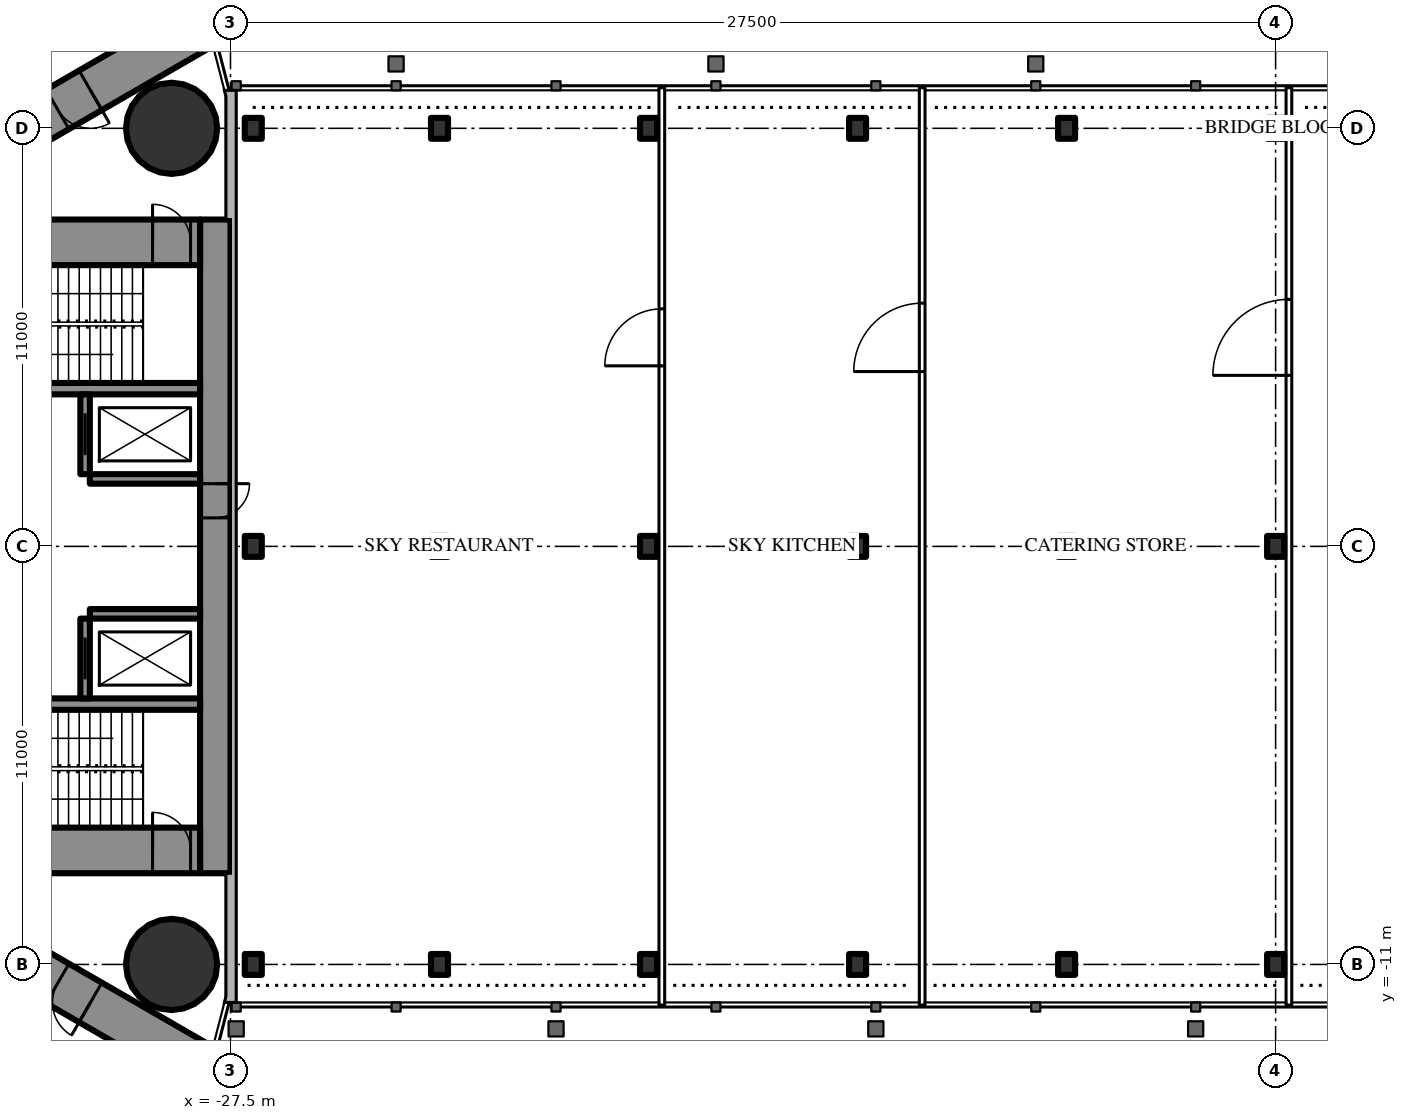
"""IFC4 building model, lengths in metres.
Left out: names, types, materials, properties, quantities, classifications, styles, units other than length and angle.
Written with IfcOpenShell. Run it as: python <this file> out.ifc"""

import sys

from ifc_helpers import new_model, si_unit, direction, frame, frame_2d, origin, origin_2d, place, context, subcontext, project, spatial, rectangle, circle, i_section, extrude, element, fill, save


model = new_model("IFC4")
c1 = context("Model", 3, precision=1e-05, world=origin(), true_north=direction((0.0, 1.0)))
c2 = subcontext(c1, "Body", "Model", "MODEL_VIEW")
j1 = project(units=[si_unit("LENGTHUNIT", "METRE"), si_unit("PLANEANGLEUNIT", "RADIAN")], contexts=[c1])
p1 = place(None, origin())
s1 = spatial("IfcSite", under=j1, at=p1, CompositionType="ELEMENT")
p2 = place(p1, origin())
s2 = spatial("IfcBuilding", under=s1, at=p2, CompositionType="ELEMENT")
p3 = place(p2, frame((0.0, 0.0, 251.9)))
s3 = spatial("IfcBuildingStorey", under=s2, at=p3, CompositionType="ELEMENT", Elevation=251.9)
for number, where, z_axis, x_axis in (
    (1, (-29.05, -11.0, 0.0), (0.0, 0.0, 1.0), (1.0, 0.0, 0.0)),
    (2, (-29.05, 11.0, 0.0), (0.0, 0.0, 1.0), (1.0, 0.0, 0.0)),
):
    element("IfcColumn", number, at=place(p3, frame(where, z_axis=z_axis, x_axis=x_axis)), inside=s3, PredefinedType="COLUMN", context=c2, shape_type="SweptSolid", body=[
        extrude(circle(Radius=1.2, at=origin_2d()), origin(), (0.0, 0.0, 1.0), 5.4),
    ])
p4 = place(p3, frame((-27.9, 8.6, 0.0), z_axis=(0.0, 0.0, 1.0), x_axis=(0.0, -1.0, 0.0)))
e3 = element("IfcWall", 3, at=p4, inside=s3, PredefinedType="SHEAR", context=c2, shape_type="SweptSolid", body=[
    extrude(rectangle(XDim=17.2, YDim=0.8, at=frame_2d((8.6, 0.0))), origin(), (0.0, 0.0, 1.0), 5.4),
])
p5 = place(p4, frame((6.95, 0.0, 0.0)))
e4 = element("IfcOpeningElement", 4, at=p5, cuts=e3, PredefinedType="OPENING", context=c2, shape_type="SweptSolid", body=[
    extrude(rectangle(XDim=0.9, YDim=2.2, at=frame_2d((0.45, 1.1))), frame((0.0, 0.41, 0.0), z_axis=(0.0, -1.0, 0.0), x_axis=(1.0, 0.0, 0.0)), (0.0, 0.0, 1.0), 0.82),
])
p6 = place(p3, frame((-28.3, 8.0, 0.0), z_axis=(0.0, 0.0, 1.0), x_axis=(-1.0, 0.0, 0.0)))
e5 = element("IfcWall", 5, at=p6, inside=s3, PredefinedType="SHEAR", context=c2, shape_type="SweptSolid", body=[
    extrude(rectangle(XDim=8.4, YDim=1.2, at=frame_2d((4.2, 0.0))), origin(), (0.0, 0.0, 1.0), 5.4),
])
p7 = place(p6, frame((0.25, 0.0, 0.0)))
e6 = element("IfcOpeningElement", 6, at=p7, cuts=e5, PredefinedType="OPENING", context=c2, shape_type="SweptSolid", body=[
    extrude(rectangle(XDim=1.0, YDim=2.2, at=frame_2d((0.5, 1.1))), frame((0.0, 0.61, 0.0), z_axis=(0.0, -1.0, 0.0), x_axis=(1.0, 0.0, 0.0)), (0.0, 0.0, 1.0), 1.22),
])
p8 = place(p3, frame((-28.3, -8.0, 0.0), z_axis=(0.0, 0.0, 1.0), x_axis=(-1.0, 0.0, 0.0)))
e7 = element("IfcWall", 7, at=p8, inside=s3, PredefinedType="SHEAR", context=c2, shape_type="SweptSolid", body=[
    extrude(rectangle(XDim=8.4, YDim=1.2, at=frame_2d((4.2, 0.0))), origin(), (0.0, 0.0, 1.0), 5.4),
])
p9 = place(p8, frame((0.25, 0.0, 0.0)))
e8 = element("IfcOpeningElement", 8, at=p9, cuts=e7, PredefinedType="OPENING", context=c2, shape_type="SweptSolid", body=[
    extrude(rectangle(XDim=1.0, YDim=2.2, at=frame_2d((0.5, 1.1))), frame((0.0, 0.61, 0.0), z_axis=(0.0, -1.0, 0.0), x_axis=(1.0, 0.0, 0.0)), (0.0, 0.0, 1.0), 1.22),
])
for number, where, z_axis, x_axis in (
    (9, (-28.3, 4.15, 0.0), (0.0, 0.0, 1.0), (-1.0, 0.0, 0.0)),
    (10, (-28.3, -4.15, 0.0), (0.0, 0.0, 1.0), (-1.0, 0.0, 0.0)),
):
    element("IfcWall", number, at=place(p3, frame(where, z_axis=z_axis, x_axis=x_axis)), inside=s3, PredefinedType="SHEAR", context=c2, shape_type="SweptSolid", body=[
        extrude(rectangle(XDim=8.4, YDim=0.3, at=frame_2d((4.2, 0.0))), origin(), (0.0, 0.0, 1.0), 5.4),
    ])
p10 = place(p3, frame((-31.325, 4.0, 0.0), z_axis=(0.0, 0.0, 1.0), x_axis=(0.0, -1.0, 0.0)))
e11 = element("IfcWall", 11, at=p10, inside=s3, PredefinedType="SHEAR", context=c2, shape_type="SweptSolid", body=[
    extrude(rectangle(XDim=2.1, YDim=0.25, at=frame_2d((1.05, 0.0))), origin(), (0.0, 0.0, 1.0), 5.4),
])
p11 = place(p10, frame((0.5, 0.0, 0.0)))
e12 = element("IfcOpeningElement", 12, at=p11, cuts=e11, PredefinedType="OPENING", context=c2, shape_type="SweptSolid", body=[
    extrude(rectangle(XDim=1.1, YDim=2.2, at=frame_2d((0.55, 1.1))), frame((0.0, 0.135, 0.0), z_axis=(0.0, -1.0, 0.0), x_axis=(1.0, 0.0, 0.0)), (0.0, 0.0, 1.0), 0.27),
])
p12 = place(p3, frame((-28.3, 1.775, 0.0), z_axis=(0.0, 0.0, 1.0), x_axis=(-1.0, 0.0, 0.0)))
e13 = element("IfcWall", 13, at=p12, inside=s3, PredefinedType="SHEAR", context=c2, shape_type="SweptSolid", body=[
    extrude(rectangle(XDim=2.9, YDim=0.25, at=frame_2d((1.45, 0.0))), origin(), (0.0, 0.0, 1.0), 5.4),
])
p13 = place(p3, frame((-31.325, -1.9, 0.0), z_axis=(0.0, 0.0, 1.0), x_axis=(0.0, -1.0, 0.0)))
e14 = element("IfcWall", 14, at=p13, inside=s3, PredefinedType="SHEAR", context=c2, shape_type="SweptSolid", body=[
    extrude(rectangle(XDim=2.1, YDim=0.25, at=frame_2d((1.05, 0.0))), origin(), (0.0, 0.0, 1.0), 5.4),
])
p14 = place(p13, frame((0.5, 0.0, 0.0)))
e15 = element("IfcOpeningElement", 15, at=p14, cuts=e14, PredefinedType="OPENING", context=c2, shape_type="SweptSolid", body=[
    extrude(rectangle(XDim=1.1, YDim=2.2, at=frame_2d((0.55, 1.1))), frame((0.0, 0.135, 0.0), z_axis=(0.0, -1.0, 0.0), x_axis=(1.0, 0.0, 0.0)), (0.0, 0.0, 1.0), 0.27),
])
p15 = place(p3, frame((-28.3, -1.775, 0.0), z_axis=(0.0, 0.0, 1.0), x_axis=(-1.0, 0.0, 0.0)))
e16 = element("IfcWall", 16, at=p15, inside=s3, PredefinedType="SHEAR", context=c2, shape_type="SweptSolid", body=[
    extrude(rectangle(XDim=2.9, YDim=0.25, at=frame_2d((1.45, 0.0))), origin(), (0.0, 0.0, 1.0), 5.4),
])
p16 = place(p3, frame((-27.2, 14.3, 0.0), z_axis=(0.0, 0.0, 1.0), x_axis=(-0.866026593062, -0.499997940104, 0.0)))
e17 = element("IfcWall", 17, at=p16, inside=s3, PredefinedType="SHEAR", context=c2, shape_type="SweptSolid", body=[
    extrude(rectangle(XDim=28.946, YDim=1.2, at=frame_2d((14.473, 0.0))), origin(), (0.0, 0.0, 1.0), 5.4),
])
p17 = place(p16, frame((4.6, 0.0, 0.0)))
e18 = element("IfcOpeningElement", 18, at=p17, cuts=e17, PredefinedType="OPENING", context=c2, shape_type="SweptSolid", body=[
    extrude(rectangle(XDim=1.0, YDim=2.2, at=frame_2d((0.5, 1.1))), frame((0.0, 0.61, 0.0), z_axis=(0.0, -1.0, 0.0), x_axis=(1.0, 0.0, 0.0)), (0.0, 0.0, 1.0), 1.22),
])
p18 = place(p16, frame((13.395, 0.0, 0.0)))
e19 = element("IfcOpeningElement", 19, at=p18, cuts=e17, PredefinedType="OPENING", context=c2, shape_type="SweptSolid", body=[
    extrude(rectangle(XDim=1.8, YDim=2.2, at=frame_2d((0.9, 1.1))), frame((0.0, 0.61, 0.0), z_axis=(0.0, -1.0, 0.0), x_axis=(1.0, 0.0, 0.0)), (0.0, 0.0, 1.0), 1.22),
])
p19 = place(p3, frame((-27.2, -14.3, 0.0), z_axis=(0.0, 0.0, 1.0), x_axis=(-0.866024021859, 0.500002393557, 0.0)))
e20 = element("IfcWall", 20, at=p19, inside=s3, PredefinedType="SHEAR", context=c2, shape_type="SweptSolid", body=[
    extrude(rectangle(XDim=27.907, YDim=1.2, at=frame_2d((13.954, 0.0))), origin(), (0.0, 0.0, 1.0), 5.4),
])
p20 = place(p19, frame((4.6, 0.0, 0.0)))
e21 = element("IfcOpeningElement", 21, at=p20, cuts=e20, PredefinedType="OPENING", context=c2, shape_type="SweptSolid", body=[
    extrude(rectangle(XDim=1.0, YDim=2.2, at=frame_2d((0.5, 1.1))), frame((0.0, 0.61, 0.0), z_axis=(0.0, -1.0, 0.0), x_axis=(1.0, 0.0, 0.0)), (0.0, 0.0, 1.0), 1.22),
])
p21 = place(p19, frame((13.395, 0.0, 0.0)))
e22 = element("IfcOpeningElement", 22, at=p21, cuts=e20, PredefinedType="OPENING", context=c2, shape_type="SweptSolid", body=[
    extrude(rectangle(XDim=1.8, YDim=2.2, at=frame_2d((0.9, 1.1))), frame((0.0, 0.61, 0.0), z_axis=(0.0, -1.0, 0.0), x_axis=(1.0, 0.0, 0.0)), (0.0, 0.0, 1.0), 1.22),
])
for number, where, z_axis, x_axis in (
    (23, (-26.9, -11.0, 0.0), (0.0, 0.0, 1.0), (1.0, 0.0, 0.0)),
    (24, (-22.0, -11.0, 0.0), (0.0, 0.0, 1.0), (1.0, 0.0, 0.0)),
    (25, (-16.5, -11.0, 0.0), (0.0, 0.0, 1.0), (1.0, 0.0, 0.0)),
    (26, (-11.0, -11.0, 0.0), (0.0, 0.0, 1.0), (1.0, 0.0, 0.0)),
    (27, (-5.5, -11.0, 0.0), (0.0, 0.0, 1.0), (1.0, 0.0, 0.0)),
    (28, (0.0, -11.0, 0.0), (0.0, 0.0, 1.0), (1.0, 0.0, 0.0)),
    (29, (-26.9, 0.0, 0.0), (0.0, 0.0, 1.0), (1.0, 0.0, 0.0)),
    (30, (-22.0, 0.0, 0.0), (0.0, 0.0, 1.0), (1.0, 0.0, 0.0)),
    (31, (-16.5, 0.0, 0.0), (0.0, 0.0, 1.0), (1.0, 0.0, 0.0)),
    (32, (-11.0, 0.0, 0.0), (0.0, 0.0, 1.0), (1.0, 0.0, 0.0)),
    (33, (-5.5, 0.0, 0.0), (0.0, 0.0, 1.0), (1.0, 0.0, 0.0)),
    (34, (0.0, 0.0, 0.0), (0.0, 0.0, 1.0), (1.0, 0.0, 0.0)),
    (35, (-26.9, 11.0, 0.0), (0.0, 0.0, 1.0), (1.0, 0.0, 0.0)),
    (36, (-22.0, 11.0, 0.0), (0.0, 0.0, 1.0), (1.0, 0.0, 0.0)),
    (37, (-16.5, 11.0, 0.0), (0.0, 0.0, 1.0), (1.0, 0.0, 0.0)),
    (38, (-11.0, 11.0, 0.0), (0.0, 0.0, 1.0), (1.0, 0.0, 0.0)),
    (39, (-5.5, 11.0, 0.0), (0.0, 0.0, 1.0), (1.0, 0.0, 0.0)),
    (40, (0.0, 11.0, 0.0), (0.0, 0.0, 1.0), (1.0, 0.0, 0.0)),
):
    element("IfcColumn", number, at=place(p3, frame(where, z_axis=z_axis, x_axis=x_axis)), inside=s3, PredefinedType="COLUMN", context=c2, shape_type="SweptSolid", body=[
        extrude(i_section(OverallWidth=0.448, OverallDepth=0.55, WebThickness=0.072, FlangeThickness=0.115, FilletRadius=0.02, at=origin_2d()), origin(), (0.0, 0.0, 1.0), 5.4),
    ])
p22 = place(p3, frame((-28.681, 16.101, 0.0), z_axis=(0.0, 0.0, 1.0), x_axis=(-0.866024860443, -0.500000941094, 0.0)))
e41 = element("IfcWall", 41, at=p22, inside=s3, PredefinedType="PARTITIONING", context=c2, shape_type="SweptSolid", body=[
    extrude(rectangle(XDim=32.201, YDim=0.2, at=frame_2d((16.101, 0.0))), origin(), (0.0, 0.0, 1.0), 5.15),
])
p23 = place(p22, frame((7.266, 0.0, 0.0)))
e42 = element("IfcOpeningElement", 42, at=p23, cuts=e41, PredefinedType="OPENING", context=c2, shape_type="SweptSolid", body=[
    extrude(rectangle(XDim=1.8, YDim=2.2, at=frame_2d((0.9, 1.1))), frame((0.0, 0.11, 0.0), z_axis=(0.0, -1.0, 0.0), x_axis=(1.0, 0.0, 0.0)), (0.0, 0.0, 1.0), 0.22),
])
p24 = place(p22, frame((17.182, 0.0, 0.0)))
e43 = element("IfcOpeningElement", 43, at=p24, cuts=e41, PredefinedType="OPENING", context=c2, shape_type="SweptSolid", body=[
    extrude(rectangle(XDim=2.0, YDim=2.4, at=frame_2d((1.0, 1.2))), frame((0.0, 0.11, 0.0), z_axis=(0.0, -1.0, 0.0), x_axis=(1.0, 0.0, 0.0)), (0.0, 0.0, 1.0), 0.22),
])
p25 = place(p22, frame((21.43, 0.0, 0.0)))
e44 = element("IfcOpeningElement", 44, at=p25, cuts=e41, PredefinedType="OPENING", context=c2, shape_type="SweptSolid", body=[
    extrude(rectangle(XDim=1.8, YDim=2.2, at=frame_2d((0.9, 1.1))), frame((0.0, 0.11, 0.0), z_axis=(0.0, -1.0, 0.0), x_axis=(1.0, 0.0, 0.0)), (0.0, 0.0, 1.0), 0.22),
])
p26 = place(p22, frame((27.29, 0.0, 0.0)))
e45 = element("IfcOpeningElement", 45, at=p26, cuts=e41, PredefinedType="OPENING", context=c2, shape_type="SweptSolid", body=[
    extrude(rectangle(XDim=1.8, YDim=2.2, at=frame_2d((0.9, 1.1))), frame((0.0, 0.11, 0.0), z_axis=(0.0, -1.0, 0.0), x_axis=(1.0, 0.0, 0.0)), (0.0, 0.0, 1.0), 0.22),
])
p27 = place(p3, frame((-28.681, -16.101, 0.0), z_axis=(0.0, 0.0, 1.0), x_axis=(-0.866026079773, 0.499998829152, 0.0)))
e46 = element("IfcWall", 46, at=p27, inside=s3, PredefinedType="PARTITIONING", context=c2, shape_type="SweptSolid", body=[
    extrude(rectangle(XDim=11.674, YDim=0.2, at=frame_2d((5.837, 0.0))), origin(), (0.0, 0.0, 1.0), 5.15),
])
p28 = place(p27, frame((4.837, 0.0, 0.0)))
e47 = element("IfcOpeningElement", 47, at=p28, cuts=e46, PredefinedType="OPENING", context=c2, shape_type="SweptSolid", body=[
    extrude(rectangle(XDim=2.0, YDim=2.4, at=frame_2d((1.0, 1.2))), frame((0.0, 0.11, 0.0), z_axis=(0.0, -1.0, 0.0), x_axis=(1.0, 0.0, 0.0)), (0.0, 0.0, 1.0), 0.22),
])
p29 = place(p3, frame((-16.15, -12.07, 0.0), z_axis=(0.0, 0.0, 1.0), x_axis=(0.0, 1.0, 0.0)))
e48 = element("IfcWall", 48, at=p29, inside=s3, PredefinedType="PARTITIONING", context=c2, shape_type="SweptSolid", body=[
    extrude(rectangle(XDim=24.14, YDim=0.15, at=frame_2d((12.07, 0.0))), origin(), (0.0, 0.0, 1.0), 5.2),
])
p30 = place(p29, frame((16.82, 0.0, 0.0)))
e49 = element("IfcOpeningElement", 49, at=p30, cuts=e48, PredefinedType="OPENING", context=c2, shape_type="SweptSolid", body=[
    extrude(rectangle(XDim=1.5, YDim=2.2, at=frame_2d((0.75, 1.1))), frame((0.0, 0.085, 0.0), z_axis=(0.0, -1.0, 0.0), x_axis=(1.0, 0.0, 0.0)), (0.0, 0.0, 1.0), 0.17),
])
p31 = place(p3, frame((-9.3, -12.07, 0.0), z_axis=(0.0, 0.0, 1.0), x_axis=(0.0, 1.0, 0.0)))
e50 = element("IfcWall", 50, at=p31, inside=s3, PredefinedType="PARTITIONING", context=c2, shape_type="SweptSolid", body=[
    extrude(rectangle(XDim=24.14, YDim=0.15, at=frame_2d((12.07, 0.0))), origin(), (0.0, 0.0, 1.0), 5.2),
])
p32 = place(p31, frame((16.67, 0.0, 0.0)))
e51 = element("IfcOpeningElement", 51, at=p32, cuts=e50, PredefinedType="OPENING", context=c2, shape_type="SweptSolid", body=[
    extrude(rectangle(XDim=1.8, YDim=2.2, at=frame_2d((0.9, 1.1))), frame((0.0, 0.085, 0.0), z_axis=(0.0, -1.0, 0.0), x_axis=(1.0, 0.0, 0.0)), (0.0, 0.0, 1.0), 0.17),
])
p33 = place(p3, frame((0.35, -12.07, 0.0), z_axis=(0.0, 0.0, 1.0), x_axis=(0.0, 1.0, 0.0)))
e52 = element("IfcWall", 52, at=p33, inside=s3, PredefinedType="PARTITIONING", context=c2, shape_type="SweptSolid", body=[
    extrude(rectangle(XDim=24.14, YDim=0.15, at=frame_2d((12.07, 0.0))), origin(), (0.0, 0.0, 1.0), 5.2),
])
p34 = place(p33, frame((16.57, 0.0, 0.0)))
e53 = element("IfcOpeningElement", 53, at=p34, cuts=e52, PredefinedType="OPENING", context=c2, shape_type="SweptSolid", body=[
    extrude(rectangle(XDim=2.0, YDim=2.4, at=frame_2d((1.0, 1.2))), frame((0.0, 0.085, 0.0), z_axis=(0.0, -1.0, 0.0), x_axis=(1.0, 0.0, 0.0)), (0.0, 0.0, 1.0), 0.17),
])
p35 = place(p17, origin())
e54 = element("IfcDoor", 54, at=p35, inside=s3, OperationType="SINGLE_SWING_LEFT", PredefinedType="DOOR", context=c2, shape_type="SweptSolid", body=[
    extrude(rectangle(XDim=1.0, YDim=2.2, at=frame_2d((0.5, 1.1))), frame((0.0, 0.025, 0.0), z_axis=(0.0, -1.0, 0.0), x_axis=(1.0, 0.0, 0.0)), (0.0, 0.0, 1.0), 0.05),
])
fill(e18, e54)
p36 = place(p20, origin())
e55 = element("IfcDoor", 55, at=p36, inside=s3, OperationType="SINGLE_SWING_LEFT", PredefinedType="DOOR", context=c2, shape_type="SweptSolid", body=[
    extrude(rectangle(XDim=1.0, YDim=2.2, at=frame_2d((0.5, 1.1))), frame((0.0, 0.025, 0.0), z_axis=(0.0, -1.0, 0.0), x_axis=(1.0, 0.0, 0.0)), (0.0, 0.0, 1.0), 0.05),
])
fill(e21, e55)
p37 = place(p7, origin())
e56 = element("IfcDoor", 56, at=p37, inside=s3, OperationType="SINGLE_SWING_RIGHT", PredefinedType="DOOR", context=c2, shape_type="SweptSolid", body=[
    extrude(rectangle(XDim=1.0, YDim=2.2, at=frame_2d((0.5, 1.1))), frame((0.0, 0.025, 0.0), z_axis=(0.0, -1.0, 0.0), x_axis=(1.0, 0.0, 0.0)), (0.0, 0.0, 1.0), 0.05),
])
fill(e6, e56)
p38 = place(p9, origin())
e57 = element("IfcDoor", 57, at=p38, inside=s3, OperationType="SINGLE_SWING_RIGHT", PredefinedType="DOOR", context=c2, shape_type="SweptSolid", body=[
    extrude(rectangle(XDim=1.0, YDim=2.2, at=frame_2d((0.5, 1.1))), frame((0.0, 0.025, 0.0), z_axis=(0.0, -1.0, 0.0), x_axis=(1.0, 0.0, 0.0)), (0.0, 0.0, 1.0), 0.05),
])
fill(e8, e57)
p39 = place(p5, origin())
e58 = element("IfcDoor", 58, at=p39, inside=s3, OperationType="SINGLE_SWING_LEFT", PredefinedType="DOOR", context=c2, shape_type="SweptSolid", body=[
    extrude(rectangle(XDim=0.9, YDim=2.2, at=frame_2d((0.45, 1.1))), frame((0.0, 0.025, 0.0), z_axis=(0.0, -1.0, 0.0), x_axis=(1.0, 0.0, 0.0)), (0.0, 0.0, 1.0), 0.05),
])
fill(e4, e58)
p40 = place(p30, origin())
e59 = element("IfcDoor", 59, at=p40, inside=s3, OperationType="DOUBLE_SWING_LEFT", PredefinedType="DOOR", context=c2, shape_type="SweptSolid", body=[
    extrude(rectangle(XDim=1.5, YDim=2.2, at=frame_2d((0.75, 1.1))), frame((0.0, 0.025, 0.0), z_axis=(0.0, -1.0, 0.0), x_axis=(1.0, 0.0, 0.0)), (0.0, 0.0, 1.0), 0.05),
])
fill(e49, e59)
p41 = place(p32, origin())
e60 = element("IfcDoor", 60, at=p41, inside=s3, OperationType="DOUBLE_DOOR_SINGLE_SWING", PredefinedType="DOOR", context=c2, shape_type="SweptSolid", body=[
    extrude(rectangle(XDim=1.8, YDim=2.2, at=frame_2d((0.9, 1.1))), frame((0.0, 0.025, 0.0), z_axis=(0.0, -1.0, 0.0), x_axis=(1.0, 0.0, 0.0)), (0.0, 0.0, 1.0), 0.05),
])
fill(e51, e60)
p42 = place(p34, origin())
e61 = element("IfcDoor", 61, at=p42, inside=s3, OperationType="DOUBLE_DOOR_SINGLE_SWING", PredefinedType="DOOR", context=c2, shape_type="SweptSolid", body=[
    extrude(rectangle(XDim=2.0, YDim=2.4, at=frame_2d((1.0, 1.2))), frame((0.0, 0.025, 0.0), z_axis=(0.0, -1.0, 0.0), x_axis=(1.0, 0.0, 0.0)), (0.0, 0.0, 1.0), 0.05),
])
fill(e53, e61)
p43 = place(p11, origin())
e62 = element("IfcDoor", 62, at=p43, inside=s3, OperationType="SLIDING_TO_LEFT", PredefinedType="USERDEFINED", context=c2, shape_type="SweptSolid", body=[
    extrude(rectangle(XDim=1.1, YDim=2.2, at=frame_2d((0.55, 1.1))), frame((0.0, 0.025, 0.0), z_axis=(0.0, -1.0, 0.0), x_axis=(1.0, 0.0, 0.0)), (0.0, 0.0, 1.0), 0.05),
])
fill(e12, e62)
p44 = place(p14, origin())
e63 = element("IfcDoor", 63, at=p44, inside=s3, OperationType="SLIDING_TO_LEFT", PredefinedType="USERDEFINED", context=c2, shape_type="SweptSolid", body=[
    extrude(rectangle(XDim=1.1, YDim=2.2, at=frame_2d((0.55, 1.1))), frame((0.0, 0.025, 0.0), z_axis=(0.0, -1.0, 0.0), x_axis=(1.0, 0.0, 0.0)), (0.0, 0.0, 1.0), 0.05),
])
fill(e15, e63)
save(model, sys.argv[1])
